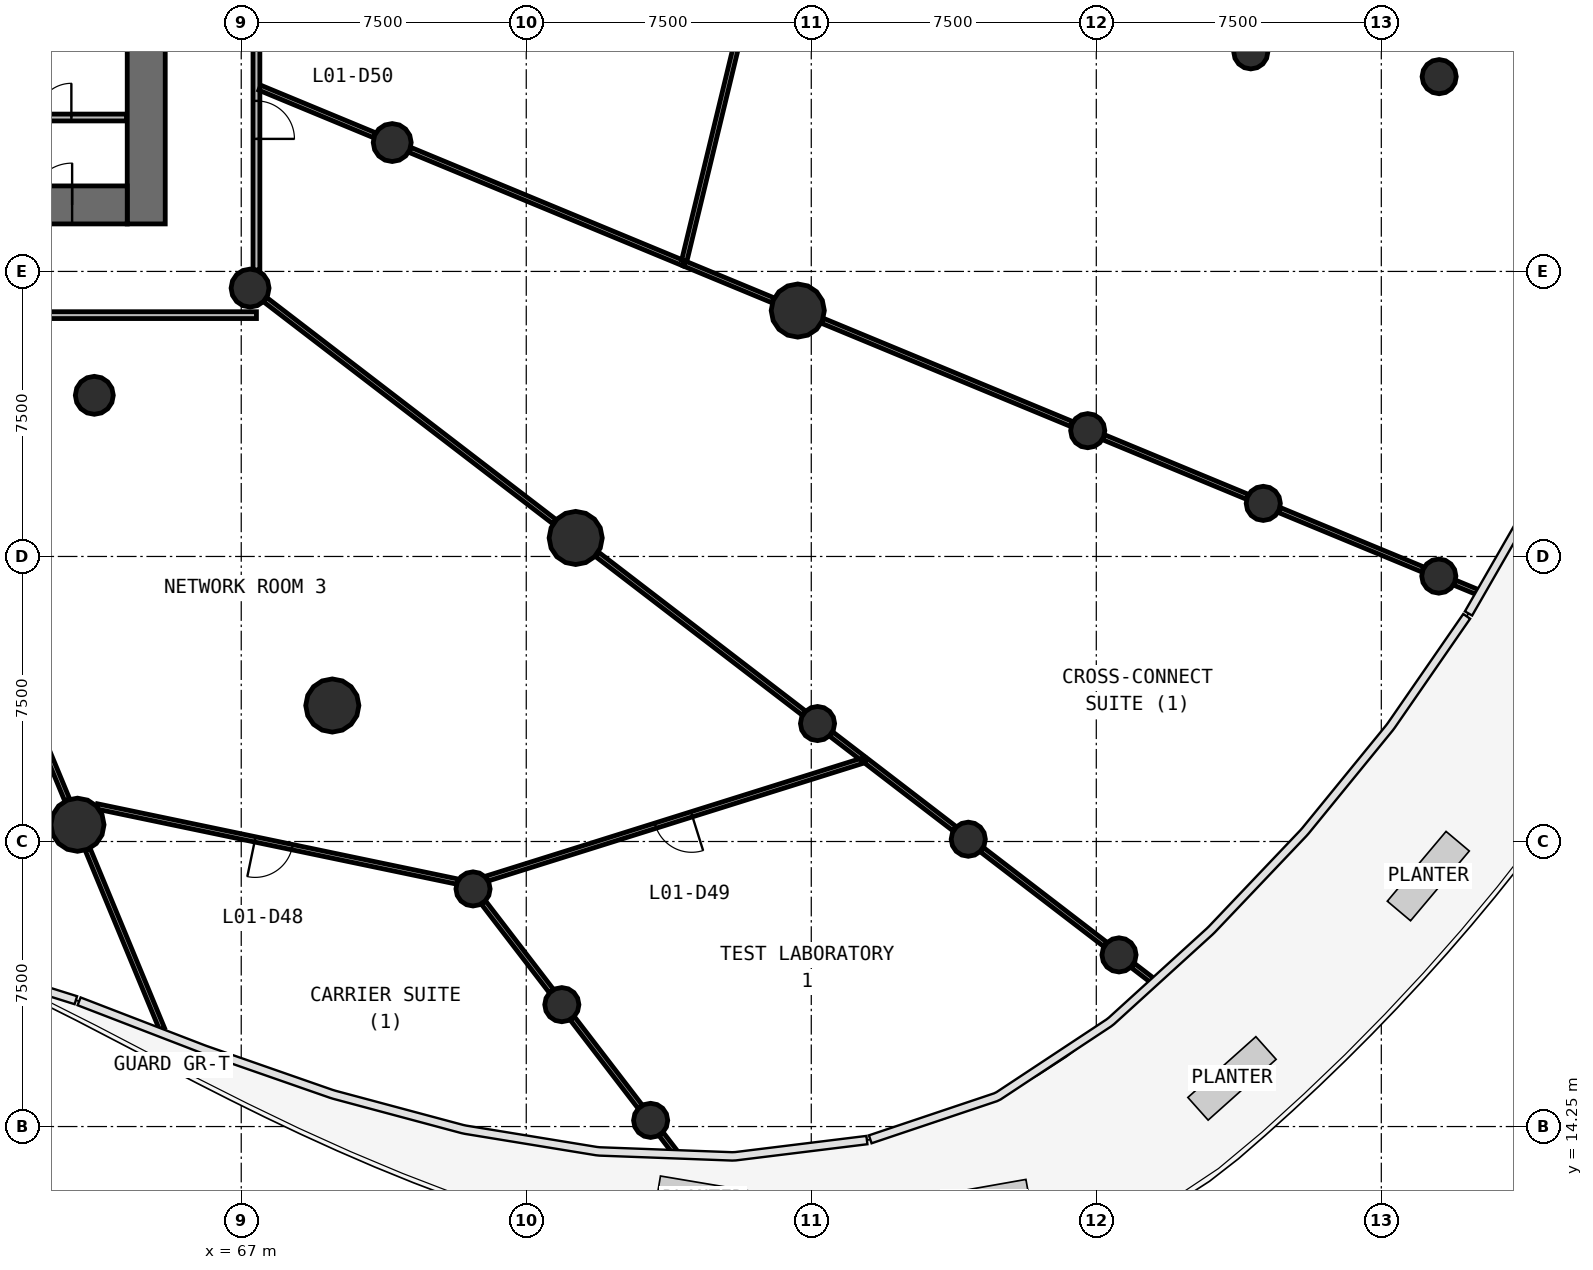
"""IFC4 building model, lengths in metres.
Left out: names, types, materials, properties, quantities, classifications, styles, units other than length and angle.
Written with IfcOpenShell. Run it as: python <this file> out.ifc"""

import sys

from ifc_helpers import new_model, si_unit, direction, frame, frame_2d, origin, origin_2d, place, context, subcontext, project, spatial, rectangle, circle, extrude, source, transform, mapped, element, fill, save


model = new_model("IFC4")
c1 = context("Model", 3, precision=1e-05, world=origin(), true_north=direction((0.0, 1.0)))
c2 = subcontext(c1, "Body", "Model", "MODEL_VIEW")
j1 = project(units=[si_unit("LENGTHUNIT", "METRE"), si_unit("PLANEANGLEUNIT", "RADIAN")], contexts=[c1])
p1 = place(None, origin())
s1 = spatial("IfcSite", under=j1, at=p1, CompositionType="ELEMENT")
p2 = place(p1, origin())
s2 = spatial("IfcBuilding", under=s1, at=p2, CompositionType="ELEMENT")
p3 = place(p2, frame((0.0, 0.0, 5.0)))
s3 = spatial("IfcBuildingStorey", under=s2, at=p3, CompositionType="ELEMENT", Elevation=5.0)
p4 = place(p3, frame((64.5, 38.0, 0.0), z_axis=(0.0, 0.0, 1.0), x_axis=(0.0, 1.0, 0.0)))
e1 = element("IfcWall", 1, at=p4, inside=s3, PredefinedType="SHEAR", context=c2, shape_type="SweptSolid", body=[
    extrude(rectangle(XDim=20.0, YDim=1.0, at=frame_2d((10.0, 0.0))), origin(), (0.0, 0.0, 1.0), 4.4),
])
p5 = place(p4, frame((9.1, 0.0, 0.0)))
e2 = element("IfcOpeningElement", 2, at=p5, cuts=e1, PredefinedType="OPENING", context=c2, shape_type="SweptSolid", body=[
    extrude(rectangle(XDim=1.8, YDim=2.1, at=frame_2d((0.9, 1.05))), frame((0.0, 0.51, 0.0), z_axis=(0.0, -1.0, 0.0), x_axis=(1.0, 0.0, 0.0)), (0.0, 0.0, 1.0), 1.02),
])
p6 = place(p3, frame((40.0, 38.5, 0.0), z_axis=(0.0, 0.0, 1.0), x_axis=(1.0, 0.0, 0.0)))
e3 = element("IfcWall", 3, at=p6, inside=s3, PredefinedType="SHEAR", context=c2, shape_type="SweptSolid", body=[
    extrude(rectangle(XDim=24.0, YDim=1.0, at=frame_2d((12.0, 0.0))), origin(), (0.0, 0.0, 1.0), 4.4),
])
p7 = place(p6, frame((21.45, 0.0, 0.0)))
e4 = element("IfcOpeningElement", 4, at=p7, cuts=e3, PredefinedType="OPENING", context=c2, shape_type="SweptSolid", body=[
    extrude(rectangle(XDim=1.1, YDim=2.1, at=frame_2d((0.55, 1.05))), frame((0.0, 0.51, 0.0), z_axis=(0.0, -1.0, 0.0), x_axis=(1.0, 0.0, 0.0)), (0.0, 0.0, 1.0), 1.02),
])
p8 = place(p6, frame((1.95, 0.0, 0.0)))
e5 = element("IfcOpeningElement", 5, at=p8, cuts=e3, PredefinedType="OPENING", context=c2, shape_type="SweptSolid", body=[
    extrude(rectangle(XDim=1.1, YDim=2.1, at=frame_2d((0.55, 1.05))), frame((0.0, 0.51, 0.0), z_axis=(0.0, -1.0, 0.0), x_axis=(1.0, 0.0, 0.0)), (0.0, 0.0, 1.0), 1.02),
])
m1 = source(origin(), c2, "Body", "SweptSolid", [
    extrude(circle(Radius=0.7, at=origin_2d()), origin(), (0.0, 0.0, 1.0), 4.4),
])
for number, where, z_axis, x_axis in (
    (6, (62.69, 22.191, 0.0), (0.0, 0.0, 1.0), (1.0, 0.0, 0.0)),
    (7, (69.396, 25.328, 0.0), (0.0, 0.0, 1.0), (1.0, 0.0, 0.0)),
    (8, (75.801, 29.737, 0.0), (0.0, 0.0, 1.0), (1.0, 0.0, 0.0)),
    (9, (81.645, 35.721, 0.0), (0.0, 0.0, 1.0), (1.0, 0.0, 0.0)),
):
    element("IfcColumn", number, at=place(p3, frame(where, z_axis=z_axis, x_axis=x_axis)), inside=s3, PredefinedType="COLUMN", context=c2, shape_type="MappedRepresentation", body=[
        mapped(m1, transform((0.0, 0.0, 0.0), scale=1.0)),
    ])
m2 = source(origin(), c2, "Body", "SweptSolid", [
    extrude(circle(Radius=0.5, at=origin_2d()), origin(), (0.0, 0.0, 1.0), 4.4),
])
for number, where, z_axis, x_axis in (
    (10, (63.134, 33.49, 0.0), (0.0, 0.0, 1.0), (1.0, 0.0, 0.0)),
    (11, (67.232, 36.312, 0.0), (0.0, 0.0, 1.0), (1.0, 0.0, 0.0)),
    (12, (70.972, 40.141, 0.0), (0.0, 0.0, 1.0), (1.0, 0.0, 0.0)),
):
    element("IfcColumn", number, at=place(p3, frame(where, z_axis=z_axis, x_axis=x_axis)), inside=s3, PredefinedType="COLUMN", context=c2, shape_type="MappedRepresentation", body=[
        mapped(m2, transform((0.0, 0.0, 0.0), scale=1.0)),
    ])
m3 = source(origin(), c2, "Body", "SweptSolid", [
    extrude(circle(Radius=0.45, at=origin_2d()), origin(), (0.0, 0.0, 1.0), 4.05),
])
for number, where, z_axis, x_axis in (
    (13, (77.773, 14.412, 0.0), (0.0, 0.0, 1.0), (1.0, 0.0, 0.0)),
    (14, (90.098, 18.767, 0.0), (0.0, 0.0, 1.0), (1.0, 0.0, 0.0)),
    (15, (98.513, 28.734, 0.0), (0.0, 0.0, 1.0), (1.0, 0.0, 0.0)),
):
    element("IfcColumn", number, at=place(p3, frame(where, z_axis=z_axis, x_axis=x_axis)), inside=s3, PredefinedType="COLUMN", context=c2, shape_type="MappedRepresentation", body=[
        mapped(m3, transform((0.0, 0.0, 0.0), scale=1.0)),
    ])
m4 = source(origin(), c2, "Body", "SweptSolid", [
    extrude(circle(Radius=0.45, at=origin_2d()), origin(), (0.0, 0.0, 1.0), 4.4),
])
for number, where, z_axis, x_axis in (
    (16, (75.436, 17.457, 0.0), (0.0, 0.0, 1.0), (1.0, 0.0, 0.0)),
    (17, (86.131, 21.81, 0.0), (0.0, 0.0, 1.0), (1.0, 0.0, 0.0)),
    (18, (93.894, 30.647, 0.0), (0.0, 0.0, 1.0), (1.0, 0.0, 0.0)),
    (19, (98.522, 41.875, 0.0), (0.0, 0.0, 1.0), (1.0, 0.0, 0.0)),
    (20, (73.1, 20.503, 0.0), (0.0, 0.0, 1.0), (1.0, 0.0, 0.0)),
    (21, (82.165, 24.854, 0.0), (0.0, 0.0, 1.0), (1.0, 0.0, 0.0)),
    (22, (89.275, 32.56, 0.0), (0.0, 0.0, 1.0), (1.0, 0.0, 0.0)),
    (23, (93.565, 42.528, 0.0), (0.0, 0.0, 1.0), (1.0, 0.0, 0.0)),
):
    element("IfcColumn", number, at=place(p3, frame(where, z_axis=z_axis, x_axis=x_axis)), inside=s3, PredefinedType="COLUMN", context=c2, shape_type="MappedRepresentation", body=[
        mapped(m4, transform((0.0, 0.0, 0.0), scale=1.0)),
    ])
p9 = place(p3, frame((67.4, 35.6, 0.0), z_axis=(0.0, 0.0, 1.0), x_axis=(-1.0, 0.0, 0.0)))
e24 = element("IfcWall", 24, at=p9, inside=s3, PredefinedType="PARTITIONING", context=c2, shape_type="SweptSolid", body=[
    extrude(rectangle(XDim=30.8, YDim=0.18, at=frame_2d((15.4, 0.0))), origin(), (0.0, 0.0, 1.0), 3.25),
])
p10 = place(p9, frame((17.35, 0.0, 0.0)))
e25 = element("IfcOpeningElement", 25, at=p10, cuts=e24, PredefinedType="OPENING", context=c2, shape_type="SweptSolid", body=[
    extrude(rectangle(XDim=1.0, YDim=2.1, at=frame_2d((0.5, 1.05))), frame((0.0, 0.1, 0.0), z_axis=(0.0, -1.0, 0.0), x_axis=(1.0, 0.0, 0.0)), (0.0, 0.0, 1.0), 0.2),
])
p11 = place(p9, frame((14.95, 0.0, 0.0)))
e26 = element("IfcOpeningElement", 26, at=p11, cuts=e24, PredefinedType="OPENING", context=c2, shape_type="SweptSolid", body=[
    extrude(rectangle(XDim=1.0, YDim=2.1, at=frame_2d((0.5, 1.05))), frame((0.0, 0.1, 0.0), z_axis=(0.0, -1.0, 0.0), x_axis=(1.0, 0.0, 0.0)), (0.0, 0.0, 1.0), 0.2),
])
p12 = place(p9, frame((8.95, 0.0, 0.0)))
e27 = element("IfcOpeningElement", 27, at=p12, cuts=e24, PredefinedType="OPENING", context=c2, shape_type="SweptSolid", body=[
    extrude(rectangle(XDim=1.0, YDim=2.1, at=frame_2d((0.5, 1.05))), frame((0.0, 0.1, 0.0), z_axis=(0.0, -1.0, 0.0), x_axis=(1.0, 0.0, 0.0)), (0.0, 0.0, 1.0), 0.2),
])
p13 = place(p3, frame((67.4, 60.37, 0.0), z_axis=(0.0, 0.0, 1.0), x_axis=(0.0, -1.0, 0.0)))
e28 = element("IfcWall", 28, at=p13, inside=s3, PredefinedType="PARTITIONING", context=c2, shape_type="SweptSolid", body=[
    extrude(rectangle(XDim=23.583, YDim=0.18, at=frame_2d((11.791, 0.0))), origin(), (0.0, 0.0, 1.0), 3.25),
])
p14 = place(p13, frame((11.333, 0.0, 0.0)))
e29 = element("IfcOpeningElement", 29, at=p14, cuts=e28, PredefinedType="OPENING", context=c2, shape_type="SweptSolid", body=[
    extrude(rectangle(XDim=1.0, YDim=2.1, at=frame_2d((0.5, 1.05))), frame((0.0, 0.1, 0.0), z_axis=(0.0, -1.0, 0.0), x_axis=(1.0, 0.0, 0.0)), (0.0, 0.0, 1.0), 0.2),
])
p15 = place(p13, frame((4.532, 0.0, 0.0)))
e30 = element("IfcOpeningElement", 30, at=p15, cuts=e28, PredefinedType="OPENING", context=c2, shape_type="SweptSolid", body=[
    extrude(rectangle(XDim=1.0, YDim=2.1, at=frame_2d((0.5, 1.05))), frame((0.0, 0.1, 0.0), z_axis=(0.0, -1.0, 0.0), x_axis=(1.0, 0.0, 0.0)), (0.0, 0.0, 1.0), 0.2),
])
p16 = place(p13, frame((19.133, 0.0, 0.0)))
e31 = element("IfcOpeningElement", 31, at=p16, cuts=e28, PredefinedType="OPENING", context=c2, shape_type="SweptSolid", body=[
    extrude(rectangle(XDim=1.0, YDim=2.1, at=frame_2d((0.5, 1.05))), frame((0.0, 0.1, 0.0), z_axis=(0.0, -1.0, 0.0), x_axis=(1.0, 0.0, 0.0)), (0.0, 0.0, 1.0), 0.2),
])
p17 = place(p3, frame((60.23, 40.8, 0.0), z_axis=(0.0, 0.0, 1.0), x_axis=(1.0, 0.0, 0.0)))
e32 = element("IfcWall", 32, at=p17, inside=s3, PredefinedType="PARTITIONING", context=c2, shape_type="SweptSolid", body=[
    extrude(rectangle(XDim=3.75, YDim=0.18, at=frame_2d((1.875, 0.0))), origin(), (0.0, 0.0, 1.0), 4.05),
])
p18 = place(p17, frame((1.4, 0.0, 0.0)))
e33 = element("IfcOpeningElement", 33, at=p18, cuts=e32, PredefinedType="OPENING", context=c2, shape_type="SweptSolid", body=[
    extrude(rectangle(XDim=0.9, YDim=2.1, at=frame_2d((0.45, 1.05))), frame((0.0, 0.1, 0.0), z_axis=(0.0, -1.0, 0.0), x_axis=(1.0, 0.0, 0.0)), (0.0, 0.0, 1.0), 0.2),
])
p19 = place(p3, frame((83.412, 23.896, 0.0), z_axis=(0.0, 0.0, 1.0), x_axis=(-0.954121832826, -0.299418650262, 0.0)))
e34 = element("IfcWall", 34, at=p19, inside=s3, PredefinedType="PARTITIONING", context=c2, shape_type="SweptSolid", body=[
    extrude(rectangle(XDim=10.427, YDim=0.14, at=frame_2d((5.213, 0.0))), origin(), (0.0, 0.0, 1.0), 3.25),
])
p20 = place(p19, frame((4.777, 0.0, 0.0)))
e35 = element("IfcOpeningElement", 35, at=p20, cuts=e34, PredefinedType="OPENING", context=c2, shape_type="SweptSolid", body=[
    extrude(rectangle(XDim=1.0, YDim=2.1, at=frame_2d((0.5, 1.05))), frame((0.0, 0.08, 0.0), z_axis=(0.0, -1.0, 0.0), x_axis=(1.0, 0.0, 0.0)), (0.0, 0.0, 1.0), 0.16),
])
p21 = place(p3, frame((72.688, 20.695, 0.0), z_axis=(0.0, 0.0, 1.0), x_axis=(-0.978931754846, 0.204187706176, 0.0)))
e36 = element("IfcWall", 36, at=p21, inside=s3, PredefinedType="PARTITIONING", context=c2, shape_type="SweptSolid", body=[
    extrude(rectangle(XDim=9.688, YDim=0.14, at=frame_2d((4.844, 0.0))), origin(), (0.0, 0.0, 1.0), 3.25),
])
p22 = place(p21, frame((4.438, 0.0, 0.0)))
e37 = element("IfcOpeningElement", 37, at=p22, cuts=e36, PredefinedType="OPENING", context=c2, shape_type="SweptSolid", body=[
    extrude(rectangle(XDim=1.0, YDim=2.1, at=frame_2d((0.5, 1.05))), frame((0.0, 0.08, 0.0), z_axis=(0.0, -1.0, 0.0), x_axis=(1.0, 0.0, 0.0)), (0.0, 0.0, 1.0), 0.16),
])
p23 = place(p3, frame((67.633, 36.005, 0.0), z_axis=(0.0, 0.0, 1.0), x_axis=(0.793366218398, -0.608744645566, 0.0)))
e38 = element("IfcWall", 38, at=p23, inside=s3, PredefinedType="PARTITIONING", context=c2, shape_type="SweptSolid", body=[
    extrude(rectangle(XDim=9.591, YDim=0.14, at=frame_2d((4.796, 0.0))), origin(), (0.0, 0.0, 1.0), 3.25),
])
p24 = place(p3, frame((71.439, 39.948, 0.0), z_axis=(0.0, 0.0, 1.0), x_axis=(0.923876369205, -0.382691069173, 0.0)))
e39 = element("IfcWall", 39, at=p24, inside=s3, PredefinedType="PARTITIONING", context=c2, shape_type="SweptSolid", body=[
    extrude(rectangle(XDim=7.796, YDim=0.14, at=frame_2d((3.898, 0.0))), origin(), (0.0, 0.0, 1.0), 3.25),
])
p25 = place(p3, frame((59.47, 29.966, 0.0), z_axis=(0.0, 0.0, 1.0), x_axis=(0.382680867479, -0.923880594918, 0.0)))
e40 = element("IfcWall", 40, at=p25, inside=s3, PredefinedType="PARTITIONING", context=c2, shape_type="SweptSolid", body=[
    extrude(rectangle(XDim=7.71, YDim=0.14, at=frame_2d((3.855, 0.0))), origin(), (0.0, 0.0, 1.0), 3.25),
])
p26 = place(p3, frame((78.658, 37.034, 0.0), z_axis=(0.0, 0.0, 1.0), x_axis=(0.235080266969, 0.97197596065, 0.0)))
e41 = element("IfcWall", 41, at=p26, inside=s3, PredefinedType="PARTITIONING", context=c2, shape_type="SweptSolid", body=[
    extrude(rectangle(XDim=7.435, YDim=0.14, at=frame_2d((3.717, 0.0))), origin(), (0.0, 0.0, 1.0), 3.25),
])
p27 = place(p3, frame((82.296, 35.451, 0.0), z_axis=(0.0, 0.0, 1.0), x_axis=(0.923879762642, -0.382682876779, 0.0)))
e42 = element("IfcWall", 42, at=p27, inside=s3, PredefinedType="PARTITIONING", context=c2, shape_type="SweptSolid", body=[
    extrude(rectangle(XDim=7.099, YDim=0.14, at=frame_2d((3.549, 0.0))), origin(), (0.0, 0.0, 1.0), 3.25),
])
p28 = place(p3, frame((76.359, 29.309, 0.0), z_axis=(0.0, 0.0, 1.0), x_axis=(0.793338893585, -0.60878025586, 0.0)))
e43 = element("IfcWall", 43, at=p28, inside=s3, PredefinedType="PARTITIONING", context=c2, shape_type="SweptSolid", body=[
    extrude(rectangle(XDim=6.863, YDim=0.14, at=frame_2d((3.431, 0.0))), origin(), (0.0, 0.0, 1.0), 3.25),
])
p29 = place(p3, frame((62.96, 21.54, 0.0), z_axis=(0.0, 0.0, 1.0), x_axis=(0.382657019909, -0.923890472466, 0.0)))
e44 = element("IfcWall", 44, at=p29, inside=s3, PredefinedType="PARTITIONING", context=c2, shape_type="SweptSolid", body=[
    extrude(rectangle(XDim=5.11, YDim=0.14, at=frame_2d((2.555, 0.0))), origin(), (0.0, 0.0, 1.0), 3.25),
])
p30 = place(p3, frame((86.492, 21.533, 0.0), z_axis=(0.0, 0.0, 1.0), x_axis=(0.793355578527, -0.608758512072, 0.0)))
e45 = element("IfcWall", 45, at=p30, inside=s3, PredefinedType="PARTITIONING", context=c2, shape_type="SweptSolid", body=[
    extrude(rectangle(XDim=4.091, YDim=0.14, at=frame_2d((2.045, 0.0))), origin(), (0.0, 0.0, 1.0), 3.25),
])
p31 = place(p3, frame((94.314, 30.473, 0.0), z_axis=(0.0, 0.0, 1.0), x_axis=(0.923874959136, -0.382694473284, 0.0)))
e46 = element("IfcWall", 46, at=p31, inside=s3, PredefinedType="PARTITIONING", context=c2, shape_type="SweptSolid", body=[
    extrude(rectangle(XDim=4.09, YDim=0.14, at=frame_2d((2.045, 0.0))), origin(), (0.0, 0.0, 1.0), 3.25),
])
p32 = place(p3, frame((89.695, 32.386, 0.0), z_axis=(0.0, 0.0, 1.0), x_axis=(0.92386621601, -0.382715579661, 0.0)))
e47 = element("IfcWall", 47, at=p32, inside=s3, PredefinedType="PARTITIONING", context=c2, shape_type="SweptSolid", body=[
    extrude(rectangle(XDim=4.09, YDim=0.14, at=frame_2d((2.045, 0.0))), origin(), (0.0, 0.0, 1.0), 3.25),
])
p33 = place(p3, frame((67.49, 41.584, 0.0), z_axis=(0.0, 0.0, 1.0), x_axis=(0.923911109142, -0.382607190737, 0.0)))
e48 = element("IfcWall", 48, at=p33, inside=s3, PredefinedType="PARTITIONING", context=c2, shape_type="SweptSolid", body=[
    extrude(rectangle(XDim=3.264, YDim=0.14, at=frame_2d((1.632, 0.0))), origin(), (0.0, 0.0, 1.0), 3.25),
])
p34 = place(p3, frame((83.436, 23.878, 0.0), z_axis=(0.0, 0.0, 1.0), x_axis=(0.793360579515, -0.608751994552, 0.0)))
e49 = element("IfcWall", 49, at=p34, inside=s3, PredefinedType="PARTITIONING", context=c2, shape_type="SweptSolid", body=[
    extrude(rectangle(XDim=2.943, YDim=0.14, at=frame_2d((1.471, 0.0))), origin(), (0.0, 0.0, 1.0), 3.25),
])
p35 = place(p3, frame((73.376, 20.142, 0.0), z_axis=(0.0, 0.0, 1.0), x_axis=(0.608763898154, -0.793351445643, 0.0)))
e50 = element("IfcWall", 50, at=p35, inside=s3, PredefinedType="PARTITIONING", context=c2, shape_type="SweptSolid", body=[
    extrude(rectangle(XDim=2.93, YDim=0.14, at=frame_2d((1.465, 0.0))), origin(), (0.0, 0.0, 1.0), 3.25),
])
p36 = place(p3, frame((75.713, 17.097, 0.0), z_axis=(0.0, 0.0, 1.0), x_axis=(0.608804147927, -0.793320559085, 0.0)))
e51 = element("IfcWall", 51, at=p36, inside=s3, PredefinedType="PARTITIONING", context=c2, shape_type="SweptSolid", body=[
    extrude(rectangle(XDim=2.929, YDim=0.14, at=frame_2d((1.465, 0.0))), origin(), (0.0, 0.0, 1.0), 3.25),
])
p37 = place(p3, frame((78.669, 36.953, 0.0), z_axis=(0.0, 0.0, 1.0), x_axis=(0.923876063287, -0.382691807705, 0.0)))
e52 = element("IfcWall", 52, at=p37, inside=s3, PredefinedType="PARTITIONING", context=c2, shape_type="SweptSolid", body=[
    extrude(rectangle(XDim=2.515, YDim=0.14, at=frame_2d((1.258, 0.0))), origin(), (0.0, 0.0, 1.0), 3.25),
])
p38 = place(p3, frame((82.525, 24.577, 0.0), z_axis=(0.0, 0.0, 1.0), x_axis=(0.793370394363, -0.608739203065, 0.0)))
e53 = element("IfcWall", 53, at=p38, inside=s3, PredefinedType="PARTITIONING", context=c2, shape_type="SweptSolid", body=[
    extrude(rectangle(XDim=1.033, YDim=0.14, at=frame_2d((0.516, 0.0))), origin(), (0.0, 0.0, 1.0), 3.25),
])
for number, where, z_axis, x_axis in (
    (54, (98.934, 28.56, 0.0), (0.0, 0.0, 1.0), (0.924, -0.383, 0.0)),
    (55, (90.458, 18.49, 0.0), (0.0, 0.0, 1.0), (0.793, -0.609, 0.0)),
):
    element("IfcWall", number, at=place(p3, frame(where, z_axis=z_axis, x_axis=x_axis)), inside=s3, PredefinedType="PARTITIONING", context=c2, shape_type="SweptSolid", body=[
        extrude(rectangle(XDim=0.634, YDim=0.14, at=frame_2d((0.317, 0.0))), origin(), (0.0, 0.0, 1.0), 3.25),
    ])
p39 = place(p3, frame((78.05, 14.052, 0.0), z_axis=(0.0, 0.0, 1.0), x_axis=(0.608753749501, -0.793359232926, 0.0)))
e56 = element("IfcWall", 56, at=p39, inside=s3, PredefinedType="PARTITIONING", context=c2, shape_type="SweptSolid", body=[
    extrude(rectangle(XDim=0.604, YDim=0.14, at=frame_2d((0.302, 0.0))), origin(), (0.0, 0.0, 1.0), 3.25),
])
m5 = source(origin(), c2, "Body", "SweptSolid", [
    extrude(rectangle(XDim=1.1, YDim=2.1, at=frame_2d((0.55, 1.05))), frame((0.0, 0.025, 0.0), z_axis=(0.0, -1.0, 0.0), x_axis=(1.0, 0.0, 0.0)), (0.0, 0.0, 1.0), 0.05),
])
p40 = place(p7, origin())
e57 = element("IfcDoor", 57, at=p40, inside=s3, OperationType="SINGLE_SWING_RIGHT", PredefinedType="DOOR", context=c2, shape_type="MappedRepresentation", body=[
    mapped(m5, transform((0.0, 0.0, 0.0), scale=1.0)),
])
fill(e4, e57)
m6 = source(origin(), c2, "Body", "SweptSolid", [
    extrude(rectangle(XDim=1.0, YDim=2.1, at=frame_2d((0.5, 1.05))), frame((0.0, 0.025, 0.0), z_axis=(0.0, -1.0, 0.0), x_axis=(1.0, 0.0, 0.0)), (0.0, 0.0, 1.0), 0.05),
])
p41 = place(p22, origin())
e58 = element("IfcDoor", 58, at=p41, inside=s3, OperationType="SINGLE_SWING_RIGHT", PredefinedType="DOOR", context=c2, shape_type="MappedRepresentation", body=[
    mapped(m6, transform((0.0, 0.0, 0.0), scale=1.0)),
])
fill(e37, e58)
p42 = place(p20, origin())
e59 = element("IfcDoor", 59, at=p42, inside=s3, OperationType="SINGLE_SWING_LEFT", PredefinedType="DOOR", context=c2, shape_type="MappedRepresentation", body=[
    mapped(m6, transform((0.0, 0.0, 0.0), scale=1.0)),
])
fill(e35, e59)
p43 = place(p16, origin())
e60 = element("IfcDoor", 60, at=p43, inside=s3, OperationType="SINGLE_SWING_RIGHT", PredefinedType="DOOR", context=c2, shape_type="MappedRepresentation", body=[
    mapped(m6, transform((0.0, 0.0, 0.0), scale=1.0)),
])
fill(e31, e60)
m7 = source(origin(), c2, "Body", "SweptSolid", [
    extrude(rectangle(XDim=0.9, YDim=2.1, at=frame_2d((0.45, 1.05))), frame((0.0, 0.025, 0.0), z_axis=(0.0, -1.0, 0.0), x_axis=(1.0, 0.0, 0.0)), (0.0, 0.0, 1.0), 0.05),
])
p44 = place(p18, origin())
e61 = element("IfcDoor", 61, at=p44, inside=s3, OperationType="SINGLE_SWING_RIGHT", PredefinedType="DOOR", context=c2, shape_type="MappedRepresentation", body=[
    mapped(m7, transform((0.0, 0.0, 0.0), scale=1.0)),
])
fill(e33, e61)
save(model, sys.argv[1])
